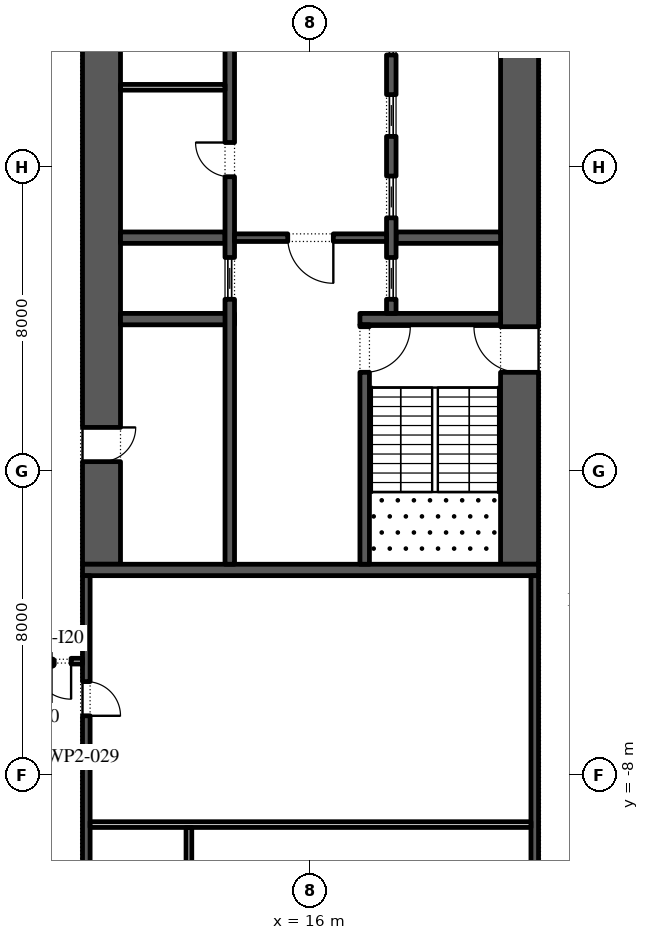
"""IFC4 building model, lengths in metres.
Left out: names, types, materials, properties, quantities, classifications, styles, units other than length and angle.
Written with IfcOpenShell. Run it as: python <this file> out.ifc"""

import sys

from ifc_helpers import new_model, si_unit, direction, frame, frame_2d, origin, place, context, subcontext, project, spatial, rectangle, extrude, element, fill, save


model = new_model("IFC4")
c1 = context("Model", 3, precision=1e-05, world=origin(), true_north=direction((0.0, 1.0)))
c2 = subcontext(c1, "Body", "Model", "MODEL_VIEW")
j1 = project(units=[si_unit("LENGTHUNIT", "METRE"), si_unit("PLANEANGLEUNIT", "RADIAN")], contexts=[c1])
p1 = place(None, origin())
s1 = spatial("IfcSite", under=j1, at=p1, CompositionType="ELEMENT")
p2 = place(p1, origin())
s2 = spatial("IfcBuilding", under=s1, at=p2, CompositionType="ELEMENT")
p3 = place(p2, frame((0.0, 0.0, 48.0)))
s3 = spatial("IfcBuildingStorey", under=s2, at=p3, CompositionType="ELEMENT", Elevation=48.0)
p4 = place(p3, frame((21.5, -2.45, 0.0), z_axis=(0.0, 0.0, 1.0), x_axis=(0.0, 1.0, 0.0)))
e1 = element("IfcWall", 1, at=p4, inside=s3, PredefinedType="SHEAR", context=c2, shape_type="SweptSolid", body=[
    extrude(rectangle(XDim=27.9, YDim=1.0, at=frame_2d((13.95, 0.0))), origin(), (0.0, 0.0, 1.0), 4.0),
])
p5 = place(p4, frame((5.05, 0.0, 0.0)))
e2 = element("IfcOpeningElement", 2, at=p5, cuts=e1, PredefinedType="OPENING", context=c2, shape_type="SweptSolid", body=[
    extrude(rectangle(XDim=1.2, YDim=2.1, at=frame_2d((0.6, 1.05))), frame((0.0, 0.51, 0.0), z_axis=(0.0, -1.0, 0.0), x_axis=(1.0, 0.0, 0.0)), (0.0, 0.0, 1.0), 1.02),
])
p6 = place(p4, frame((21.65, 0.0, 0.0)))
e3 = element("IfcOpeningElement", 3, at=p6, cuts=e1, PredefinedType="OPENING", context=c2, shape_type="SweptSolid", body=[
    extrude(rectangle(XDim=1.2, YDim=2.1, at=frame_2d((0.6, 1.05))), frame((0.0, 0.51, 0.0), z_axis=(0.0, -1.0, 0.0), x_axis=(1.0, 0.0, 0.0)), (0.0, 0.0, 1.0), 1.02),
])
p7 = place(p3, frame((10.5, -2.45, 0.0), z_axis=(0.0, 0.0, 1.0), x_axis=(0.0, 1.0, 0.0)))
e4 = element("IfcWall", 4, at=p7, inside=s3, PredefinedType="SHEAR", context=c2, shape_type="SweptSolid", body=[
    extrude(rectangle(XDim=27.9, YDim=1.0, at=frame_2d((13.95, 0.0))), origin(), (0.0, 0.0, 1.0), 4.0),
])
p8 = place(p7, frame((23.65, 0.0, 0.0)))
e5 = element("IfcOpeningElement", 5, at=p8, cuts=e4, PredefinedType="OPENING", context=c2, shape_type="SweptSolid", body=[
    extrude(rectangle(XDim=2.4, YDim=2.1, at=frame_2d((1.2, 1.05))), frame((0.0, 0.51, 0.0), z_axis=(0.0, -1.0, 0.0), x_axis=(1.0, 0.0, 0.0)), (0.0, 0.0, 1.0), 1.02),
])
p9 = place(p7, frame((2.7, 0.0, 0.0)))
e6 = element("IfcOpeningElement", 6, at=p9, cuts=e4, PredefinedType="OPENING", context=c2, shape_type="SweptSolid", body=[
    extrude(rectangle(XDim=0.9, YDim=2.1, at=frame_2d((0.45, 1.05))), frame((0.0, 0.51, 0.0), z_axis=(0.0, -1.0, 0.0), x_axis=(1.0, 0.0, 0.0)), (0.0, 0.0, 1.0), 1.02),
])
p10 = place(p3, frame((10.0, -2.6, 0.0), z_axis=(0.0, 0.0, 1.0), x_axis=(1.0, 0.0, 0.0)))
e7 = element("IfcWall", 7, at=p10, inside=s3, PredefinedType="SHEAR", context=c2, shape_type="SweptSolid", body=[
    extrude(rectangle(XDim=12.0, YDim=0.3, at=frame_2d((6.0, 0.0))), origin(), (0.0, 0.0, 1.0), 4.0),
])
p11 = place(p3, frame((17.3, 4.0, 0.0), z_axis=(0.0, 0.0, 1.0), x_axis=(1.0, 0.0, 0.0)))
e8 = element("IfcWall", 8, at=p11, inside=s3, PredefinedType="SHEAR", context=c2, shape_type="SweptSolid", body=[
    extrude(rectangle(XDim=3.7, YDim=0.3, at=frame_2d((1.85, 0.0))), origin(), (0.0, 0.0, 1.0), 4.0),
])
p12 = place(p3, frame((17.425, -2.45, 0.0), z_axis=(0.0, 0.0, 1.0), x_axis=(0.0, 1.0, 0.0)))
e9 = element("IfcWall", 9, at=p12, inside=s3, PredefinedType="SHEAR", context=c2, shape_type="SweptSolid", body=[
    extrude(rectangle(XDim=6.3, YDim=0.25, at=frame_2d((3.15, 0.0))), origin(), (0.0, 0.0, 1.0), 4.0),
])
p13 = place(p12, frame((5.05, 0.0, 0.0)))
e10 = element("IfcOpeningElement", 10, at=p13, cuts=e9, PredefinedType="OPENING", context=c2, shape_type="SweptSolid", body=[
    extrude(rectangle(XDim=1.2, YDim=2.1, at=frame_2d((0.6, 1.05))), frame((0.0, 0.135, 0.0), z_axis=(0.0, -1.0, 0.0), x_axis=(1.0, 0.0, 0.0)), (0.0, 0.0, 1.0), 0.27),
])
p14 = place(p3, frame((18.25, 6.143, 0.0), z_axis=(0.0, 0.0, 1.0), x_axis=(1.0, 0.0, 0.0)))
e11 = element("IfcWall", 11, at=p14, inside=s3, PredefinedType="SHEAR", context=c2, shape_type="SweptSolid", body=[
    extrude(rectangle(XDim=2.75, YDim=0.3, at=frame_2d((1.375, 0.0))), origin(), (0.0, 0.0, 1.0), 4.0),
])
p15 = place(p3, frame((18.125, 4.15, 0.0), z_axis=(0.0, 0.0, 1.0), x_axis=(0.0, 1.0, 0.0)))
e12 = element("IfcWall", 12, at=p15, inside=s3, PredefinedType="SHEAR", context=c2, shape_type="SweptSolid", body=[
    extrude(rectangle(XDim=14.7, YDim=0.25, at=frame_2d((7.35, 0.0))), origin(), (0.0, 0.0, 1.0), 4.0),
])
p16 = place(p15, frame((0.371, 0.0, 0.0)))
e13 = element("IfcOpeningElement", 13, at=p16, cuts=e12, PredefinedType="OPENING", context=c2, shape_type="SweptSolid", body=[
    extrude(rectangle(XDim=1.1, YDim=2.1, at=frame_2d((0.55, 1.05))), frame((0.0, 0.135, 0.0), z_axis=(0.0, -1.0, 0.0), x_axis=(1.0, 0.0, 0.0)), (0.0, 0.0, 1.0), 0.27),
])
p17 = place(p15, frame((2.514, 0.0, 0.0)))
e14 = element("IfcOpeningElement", 14, at=p17, cuts=e12, PredefinedType="OPENING", context=c2, shape_type="SweptSolid", body=[
    extrude(rectangle(XDim=1.1, YDim=2.1, at=frame_2d((0.55, 1.05))), frame((0.0, 0.135, 0.0), z_axis=(0.0, -1.0, 0.0), x_axis=(1.0, 0.0, 0.0)), (0.0, 0.0, 1.0), 0.27),
])
p18 = place(p15, frame((4.657, 0.0, 0.0)))
e15 = element("IfcOpeningElement", 15, at=p18, cuts=e12, PredefinedType="OPENING", context=c2, shape_type="SweptSolid", body=[
    extrude(rectangle(XDim=1.1, YDim=2.1, at=frame_2d((0.55, 1.05))), frame((0.0, 0.135, 0.0), z_axis=(0.0, -1.0, 0.0), x_axis=(1.0, 0.0, 0.0)), (0.0, 0.0, 1.0), 0.27),
])
p19 = place(p15, frame((6.8, 0.0, 0.0)))
e16 = element("IfcOpeningElement", 16, at=p19, cuts=e12, PredefinedType="OPENING", context=c2, shape_type="SweptSolid", body=[
    extrude(rectangle(XDim=1.1, YDim=2.1, at=frame_2d((0.55, 1.05))), frame((0.0, 0.135, 0.0), z_axis=(0.0, -1.0, 0.0), x_axis=(1.0, 0.0, 0.0)), (0.0, 0.0, 1.0), 0.27),
])
p20 = place(p15, frame((8.943, 0.0, 0.0)))
e17 = element("IfcOpeningElement", 17, at=p20, cuts=e12, PredefinedType="OPENING", context=c2, shape_type="SweptSolid", body=[
    extrude(rectangle(XDim=1.1, YDim=2.1, at=frame_2d((0.55, 1.05))), frame((0.0, 0.135, 0.0), z_axis=(0.0, -1.0, 0.0), x_axis=(1.0, 0.0, 0.0)), (0.0, 0.0, 1.0), 0.27),
])
p21 = place(p15, frame((11.086, 0.0, 0.0)))
e18 = element("IfcOpeningElement", 18, at=p21, cuts=e12, PredefinedType="OPENING", context=c2, shape_type="SweptSolid", body=[
    extrude(rectangle(XDim=1.1, YDim=2.1, at=frame_2d((0.55, 1.05))), frame((0.0, 0.135, 0.0), z_axis=(0.0, -1.0, 0.0), x_axis=(1.0, 0.0, 0.0)), (0.0, 0.0, 1.0), 0.27),
])
p22 = place(p15, frame((13.229, 0.0, 0.0)))
e19 = element("IfcOpeningElement", 19, at=p22, cuts=e12, PredefinedType="OPENING", context=c2, shape_type="SweptSolid", body=[
    extrude(rectangle(XDim=1.1, YDim=2.1, at=frame_2d((0.55, 1.05))), frame((0.0, 0.135, 0.0), z_axis=(0.0, -1.0, 0.0), x_axis=(1.0, 0.0, 0.0)), (0.0, 0.0, 1.0), 0.27),
])
p23 = place(p3, frame((11.0, 4.0, 0.0), z_axis=(0.0, 0.0, 1.0), x_axis=(1.0, 0.0, 0.0)))
e20 = element("IfcWall", 20, at=p23, inside=s3, PredefinedType="SHEAR", context=c2, shape_type="SweptSolid", body=[
    extrude(rectangle(XDim=3.0, YDim=0.3, at=frame_2d((1.5, 0.0))), origin(), (0.0, 0.0, 1.0), 4.0),
])
p24 = place(p3, frame((11.0, 6.143, 0.0), z_axis=(0.0, 0.0, 1.0), x_axis=(1.0, 0.0, 0.0)))
e21 = element("IfcWall", 21, at=p24, inside=s3, PredefinedType="SHEAR", context=c2, shape_type="SweptSolid", body=[
    extrude(rectangle(XDim=2.75, YDim=0.3, at=frame_2d((1.375, 0.0))), origin(), (0.0, 0.0, 1.0), 4.0),
])
p25 = place(p3, frame((13.875, -2.45, 0.0), z_axis=(0.0, 0.0, 1.0), x_axis=(0.0, 1.0, 0.0)))
e22 = element("IfcWall", 22, at=p25, inside=s3, PredefinedType="SHEAR", context=c2, shape_type="SweptSolid", body=[
    extrude(rectangle(XDim=21.3, YDim=0.25, at=frame_2d((10.65, 0.0))), origin(), (0.0, 0.0, 1.0), 4.0),
])
p26 = place(p25, frame((10.196, 0.0, 0.0)))
e23 = element("IfcOpeningElement", 23, at=p26, cuts=e22, PredefinedType="OPENING", context=c2, shape_type="SweptSolid", body=[
    extrude(rectangle(XDim=0.9, YDim=2.1, at=frame_2d((0.45, 1.05))), frame((0.0, 0.135, 0.0), z_axis=(0.0, -1.0, 0.0), x_axis=(1.0, 0.0, 0.0)), (0.0, 0.0, 1.0), 0.27),
])
p27 = place(p25, frame((16.475, 0.0, 0.0)))
e24 = element("IfcOpeningElement", 24, at=p27, cuts=e22, PredefinedType="OPENING", context=c2, shape_type="SweptSolid", body=[
    extrude(rectangle(XDim=0.9, YDim=2.1, at=frame_2d((0.45, 1.05))), frame((0.0, 0.135, 0.0), z_axis=(0.0, -1.0, 0.0), x_axis=(1.0, 0.0, 0.0)), (0.0, 0.0, 1.0), 0.27),
])
p28 = place(p25, frame((6.971, 0.0, 0.0)))
e25 = element("IfcOpeningElement", 25, at=p28, cuts=e22, PredefinedType="OPENING", context=c2, shape_type="SweptSolid", body=[
    extrude(rectangle(XDim=1.1, YDim=2.1, at=frame_2d((0.55, 1.05))), frame((0.0, 0.135, 0.0), z_axis=(0.0, -1.0, 0.0), x_axis=(1.0, 0.0, 0.0)), (0.0, 0.0, 1.0), 0.27),
])
p29 = place(p3, frame((11.0, 10.1, 0.0), z_axis=(0.0, 0.0, 1.0), x_axis=(1.0, 0.0, 0.0)))
e26 = element("IfcWall", 26, at=p29, inside=s3, PredefinedType="PARTITIONING", context=c2, shape_type="SweptSolid", body=[
    extrude(rectangle(XDim=2.75, YDim=0.15, at=frame_2d((1.375, 0.0))), origin(), (0.0, 0.0, 1.0), 4.0),
])
p30 = place(p3, frame((14.0, 6.143, 0.0), z_axis=(0.0, 0.0, 1.0), x_axis=(1.0, 0.0, 0.0)))
e27 = element("IfcWall", 27, at=p30, inside=s3, PredefinedType="SHEAR", context=c2, shape_type="SweptSolid", body=[
    extrude(rectangle(XDim=4.0, YDim=0.2, at=frame_2d((2.0, 0.0))), origin(), (0.0, 0.0, 1.0), 4.0),
])
p31 = place(p30, frame((1.4, 0.0, 0.0)))
e28 = element("IfcOpeningElement", 28, at=p31, cuts=e27, PredefinedType="OPENING", context=c2, shape_type="SweptSolid", body=[
    extrude(rectangle(XDim=1.2, YDim=2.1, at=frame_2d((0.6, 1.05))), frame((0.0, 0.11, 0.0), z_axis=(0.0, -1.0, 0.0), x_axis=(1.0, 0.0, 0.0)), (0.0, 0.0, 1.0), 0.22),
])
p32 = place(p3, frame((21.9, -15.8, 0.0), z_axis=(0.0, 0.0, 1.0), x_axis=(0.0, 1.0, 0.0)))
e29 = element("IfcWall", 29, at=p32, inside=s3, PredefinedType="SHEAR", context=c2, shape_type="SweptSolid", body=[
    extrude(rectangle(XDim=13.05, YDim=0.2, at=frame_2d((6.525, 0.0))), origin(), (0.0, 0.0, 1.0), 4.0),
])
p33 = place(p32, frame((4.462, 0.0, 0.0)))
e30 = element("IfcOpeningElement", 30, at=p33, cuts=e29, PredefinedType="OPENING", context=c2, shape_type="SweptSolid", body=[
    extrude(rectangle(XDim=0.9, YDim=2.1, at=frame_2d((0.45, 1.05))), frame((0.0, 0.11, 0.0), z_axis=(0.0, -1.0, 0.0), x_axis=(1.0, 0.0, 0.0)), (0.0, 0.0, 1.0), 0.22),
])
p34 = place(p3, frame((10.1, -15.8, 0.0), z_axis=(0.0, 0.0, 1.0), x_axis=(0.0, 1.0, 0.0)))
e31 = element("IfcWall", 31, at=p34, inside=s3, PredefinedType="SHEAR", context=c2, shape_type="SweptSolid", body=[
    extrude(rectangle(XDim=13.05, YDim=0.2, at=frame_2d((6.525, 0.0))), origin(), (0.0, 0.0, 1.0), 4.0),
])
p35 = place(p34, frame((1.175, 0.0, 0.0)))
e32 = element("IfcOpeningElement", 32, at=p35, cuts=e31, PredefinedType="OPENING", context=c2, shape_type="SweptSolid", body=[
    extrude(rectangle(XDim=0.9, YDim=2.1, at=frame_2d((0.45, 1.05))), frame((0.0, 0.11, 0.0), z_axis=(0.0, -1.0, 0.0), x_axis=(1.0, 0.0, 0.0)), (0.0, 0.0, 1.0), 0.22),
])
p36 = place(p34, frame((4.413, 0.0, 0.0)))
e33 = element("IfcOpeningElement", 33, at=p36, cuts=e31, PredefinedType="OPENING", context=c2, shape_type="SweptSolid", body=[
    extrude(rectangle(XDim=1.0, YDim=2.1, at=frame_2d((0.5, 1.05))), frame((0.0, 0.11, 0.0), z_axis=(0.0, -1.0, 0.0), x_axis=(1.0, 0.0, 0.0)), (0.0, 0.0, 1.0), 0.22),
])
p37 = place(p34, frame((9.363, 0.0, 0.0)))
e34 = element("IfcOpeningElement", 34, at=p37, cuts=e31, PredefinedType="OPENING", context=c2, shape_type="SweptSolid", body=[
    extrude(rectangle(XDim=0.9, YDim=2.1, at=frame_2d((0.45, 1.05))), frame((0.0, 0.11, 0.0), z_axis=(0.0, -1.0, 0.0), x_axis=(1.0, 0.0, 0.0)), (0.0, 0.0, 1.0), 0.22),
])
p38 = place(p3, frame((10.2, -9.3, 0.0), z_axis=(0.0, 0.0, 1.0), x_axis=(1.0, 0.0, 0.0)))
e35 = element("IfcWall", 35, at=p38, inside=s3, PredefinedType="PARTITIONING", context=c2, shape_type="SweptSolid", body=[
    extrude(rectangle(XDim=11.6, YDim=0.15, at=frame_2d((5.8, 0.0))), origin(), (0.0, 0.0, 1.0), 4.0),
])
p39 = place(p3, frame((12.8, -12.4, 0.0), z_axis=(0.0, 0.0, 1.0), x_axis=(0.0, 1.0, 0.0)))
e36 = element("IfcWall", 36, at=p39, inside=s3, PredefinedType="PARTITIONING", context=c2, shape_type="SweptSolid", body=[
    extrude(rectangle(XDim=3.025, YDim=0.15, at=frame_2d((1.512, 0.0))), origin(), (0.0, 0.0, 1.0), 4.0),
])
p40 = place(p3, frame((10.0, -5.0, 0.0), z_axis=(0.0, 0.0, 1.0), x_axis=(-1.0, 0.0, 0.0)))
e37 = element("IfcWall", 37, at=p40, inside=s3, PredefinedType="PARTITIONING", context=c2, shape_type="SweptSolid", body=[
    extrude(rectangle(XDim=1.6, YDim=0.15, at=frame_2d((0.8, 0.0))), origin(), (0.0, 0.0, 1.0), 4.0),
])
p41 = place(p40, frame((0.3, 0.0, 0.0)))
e38 = element("IfcOpeningElement", 38, at=p41, cuts=e37, PredefinedType="OPENING", context=c2, shape_type="SweptSolid", body=[
    extrude(rectangle(XDim=1.0, YDim=2.1, at=frame_2d((0.5, 1.05))), frame((0.0, 0.085, 0.0), z_axis=(0.0, -1.0, 0.0), x_axis=(1.0, 0.0, 0.0)), (0.0, 0.0, 1.0), 0.17),
])
p42 = place(p16, origin())
e39 = element("IfcDoor", 39, at=p42, inside=s3, OperationType="SLIDING_TO_LEFT", PredefinedType="DOOR", context=c2, shape_type="SweptSolid", body=[
    extrude(rectangle(XDim=1.1, YDim=2.1, at=frame_2d((0.55, 1.05))), frame((0.0, 0.025, 0.0), z_axis=(0.0, -1.0, 0.0), x_axis=(1.0, 0.0, 0.0)), (0.0, 0.0, 1.0), 0.05),
])
fill(e13, e39)
p43 = place(p17, origin())
e40 = element("IfcDoor", 40, at=p43, inside=s3, OperationType="SLIDING_TO_LEFT", PredefinedType="DOOR", context=c2, shape_type="SweptSolid", body=[
    extrude(rectangle(XDim=1.1, YDim=2.1, at=frame_2d((0.55, 1.05))), frame((0.0, 0.025, 0.0), z_axis=(0.0, -1.0, 0.0), x_axis=(1.0, 0.0, 0.0)), (0.0, 0.0, 1.0), 0.05),
])
fill(e14, e40)
p44 = place(p18, origin())
e41 = element("IfcDoor", 41, at=p44, inside=s3, OperationType="SLIDING_TO_LEFT", PredefinedType="DOOR", context=c2, shape_type="SweptSolid", body=[
    extrude(rectangle(XDim=1.1, YDim=2.1, at=frame_2d((0.55, 1.05))), frame((0.0, 0.025, 0.0), z_axis=(0.0, -1.0, 0.0), x_axis=(1.0, 0.0, 0.0)), (0.0, 0.0, 1.0), 0.05),
])
fill(e15, e41)
p45 = place(p19, origin())
e42 = element("IfcDoor", 42, at=p45, inside=s3, OperationType="SLIDING_TO_LEFT", PredefinedType="DOOR", context=c2, shape_type="SweptSolid", body=[
    extrude(rectangle(XDim=1.1, YDim=2.1, at=frame_2d((0.55, 1.05))), frame((0.0, 0.025, 0.0), z_axis=(0.0, -1.0, 0.0), x_axis=(1.0, 0.0, 0.0)), (0.0, 0.0, 1.0), 0.05),
])
fill(e16, e42)
p46 = place(p26, origin())
e43 = element("IfcDoor", 43, at=p46, inside=s3, OperationType="SINGLE_SWING_LEFT", PredefinedType="DOOR", context=c2, shape_type="SweptSolid", body=[
    extrude(rectangle(XDim=0.9, YDim=2.1, at=frame_2d((0.45, 1.05))), frame((0.0, 0.125, 0.0), z_axis=(0.0, -1.0, 0.0), x_axis=(1.0, 0.0, 0.0)), (0.0, 0.0, 1.0), 0.05),
])
fill(e23, e43)
p47 = place(p28, origin())
e44 = element("IfcDoor", 44, at=p47, inside=s3, OperationType="SLIDING_TO_LEFT", PredefinedType="DOOR", context=c2, shape_type="SweptSolid", body=[
    extrude(rectangle(XDim=1.1, YDim=2.1, at=frame_2d((0.55, 1.05))), frame((0.0, 0.025, 0.0), z_axis=(0.0, -1.0, 0.0), x_axis=(1.0, 0.0, 0.0)), (0.0, 0.0, 1.0), 0.05),
])
fill(e25, e44)
p48 = place(p31, frame((1.2, 0.0, 0.0), z_axis=(0.0, 0.0, 1.0), x_axis=(-1.0, 0.0, 0.0)))
e45 = element("IfcDoor", 45, at=p48, inside=s3, OperationType="SINGLE_SWING_RIGHT", PredefinedType="DOOR", context=c2, shape_type="SweptSolid", body=[
    extrude(rectangle(XDim=1.2, YDim=2.1, at=frame_2d((0.6, 1.05))), frame((0.0, 0.025, 0.0), z_axis=(0.0, -1.0, 0.0), x_axis=(1.0, 0.0, 0.0)), (0.0, 0.0, 1.0), 0.05),
])
fill(e28, e45)
p49 = place(p13, frame((1.2, 0.0, 0.0), z_axis=(0.0, 0.0, 1.0), x_axis=(-1.0, 0.0, 0.0)))
e46 = element("IfcDoor", 46, at=p49, inside=s3, OperationType="SINGLE_SWING_RIGHT", PredefinedType="DOOR", context=c2, shape_type="SweptSolid", body=[
    extrude(rectangle(XDim=1.2, YDim=2.1, at=frame_2d((0.6, 1.05))), frame((0.0, 0.025, 0.0), z_axis=(0.0, -1.0, 0.0), x_axis=(1.0, 0.0, 0.0)), (0.0, 0.0, 1.0), 0.05),
])
fill(e10, e46)
p50 = place(p5, origin())
e47 = element("IfcDoor", 47, at=p50, inside=s3, OperationType="SINGLE_SWING_LEFT", PredefinedType="DOOR", context=c2, shape_type="SweptSolid", body=[
    extrude(rectangle(XDim=1.2, YDim=2.1, at=frame_2d((0.6, 1.05))), frame((0.0, 0.025, 0.0), z_axis=(0.0, -1.0, 0.0), x_axis=(1.0, 0.0, 0.0)), (0.0, 0.0, 1.0), 0.05),
])
fill(e2, e47)
p51 = place(p9, frame((0.9, -0.95, 0.0), z_axis=(0.0, 0.0, 1.0), x_axis=(-1.0, 0.0, 0.0)))
e48 = element("IfcDoor", 48, at=p51, inside=s3, OperationType="SINGLE_SWING_RIGHT", PredefinedType="DOOR", context=c2, shape_type="SweptSolid", body=[
    extrude(rectangle(XDim=0.9, YDim=2.1, at=frame_2d((0.45, 1.05))), frame((0.0, -0.45, 0.0), z_axis=(0.0, -1.0, 0.0), x_axis=(1.0, 0.0, 0.0)), (0.0, 0.0, 1.0), 0.05),
])
fill(e6, e48)
p52 = place(p37, frame((0.9, -0.15, 0.0), z_axis=(0.0, 0.0, 1.0), x_axis=(-1.0, 0.0, 0.0)))
e49 = element("IfcDoor", 49, at=p52, inside=s3, OperationType="SINGLE_SWING_LEFT", PredefinedType="DOOR", context=c2, shape_type="SweptSolid", body=[
    extrude(rectangle(XDim=0.9, YDim=2.1, at=frame_2d((0.45, 1.05))), frame((0.0, -0.05, 0.0), z_axis=(0.0, -1.0, 0.0), x_axis=(1.0, 0.0, 0.0)), (0.0, 0.0, 1.0), 0.05),
])
fill(e34, e49)
p53 = place(p41, origin())
e50 = element("IfcDoor", 50, at=p53, inside=s3, OperationType="SINGLE_SWING_RIGHT", PredefinedType="DOOR", context=c2, shape_type="SweptSolid", body=[
    extrude(rectangle(XDim=1.0, YDim=2.1, at=frame_2d((0.5, 1.05))), frame((0.0, 0.025, 0.0), z_axis=(0.0, -1.0, 0.0), x_axis=(1.0, 0.0, 0.0)), (0.0, 0.0, 1.0), 0.05),
])
fill(e38, e50)
save(model, sys.argv[1])
